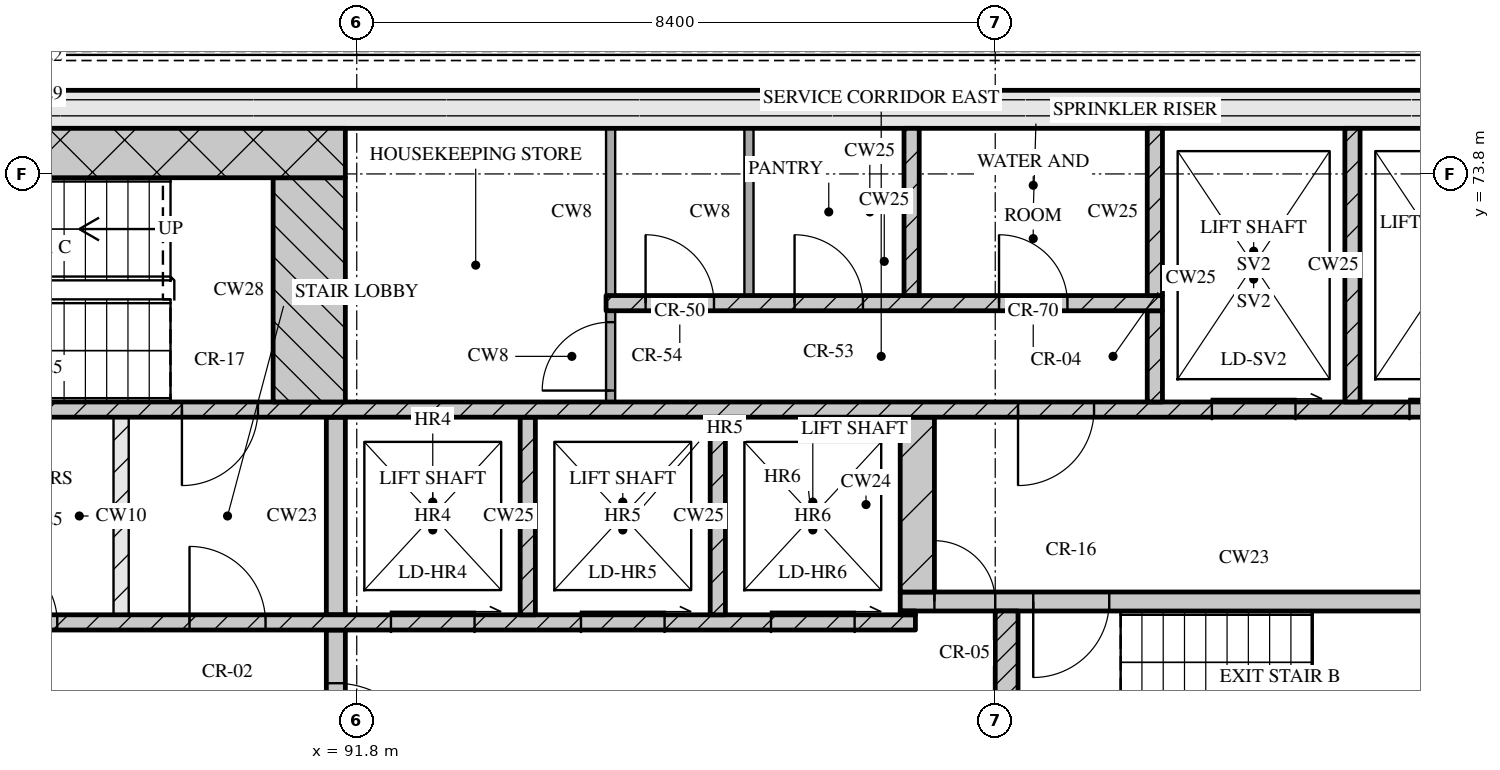
"""IFC4 building model, lengths in metres.
Left out: names, types, materials, properties, quantities, classifications, styles, units other than length and angle.
Written with IfcOpenShell. Run it as: python <this file> out.ifc"""

import sys

from ifc_helpers import new_model, si_unit, direction, frame, frame_2d, origin, place, context, subcontext, project, spatial, rectangle, extrude, element, fill, save


model = new_model("IFC4")
c1 = context("Model", 3, precision=1e-05, world=origin(), true_north=direction((0.0, 1.0)))
c2 = subcontext(c1, "Body", "Model", "MODEL_VIEW")
j1 = project(units=[si_unit("LENGTHUNIT", "METRE"), si_unit("PLANEANGLEUNIT", "RADIAN")], contexts=[c1])
p1 = place(None, origin())
s1 = spatial("IfcSite", under=j1, at=p1, CompositionType="ELEMENT")
p2 = place(p1, origin())
s2 = spatial("IfcBuilding", under=s1, at=p2, CompositionType="ELEMENT")
p3 = place(p2, frame((0.0, 0.0, 281.55)))
s3 = spatial("IfcBuildingStorey", under=s2, at=p3, CompositionType="ELEMENT", Elevation=281.55)
p4 = place(p3, frame((67.3, 74.65, 0.0), z_axis=(0.0, 0.0, 1.0), x_axis=(1.0, 0.0, 0.0)))
e1 = element("IfcWall", 1, at=p4, inside=s3, PredefinedType="SOLIDWALL", context=c2, shape_type="SweptSolid", body=[
    extrude(rectangle(XDim=40.6, YDim=0.5, at=frame_2d((20.3, 0.0))), origin(), (0.0, 0.0, 1.0), 3.32),
])
p5 = place(p3, frame((91.525, 65.2, 0.0), z_axis=(0.0, 0.0, 1.0), x_axis=(0.0, 1.0, 0.0)))
e2 = element("IfcWall", 2, at=p5, inside=s3, PredefinedType="SOLIDWALL", context=c2, shape_type="SweptSolid", body=[
    extrude(rectangle(XDim=2.6, YDim=0.25, at=frame_2d((1.3, 0.0))), origin(), (0.0, 0.0, 1.0), 3.32),
])
p6 = place(p5, frame((0.7, 0.0, 0.0)))
e3 = element("IfcOpeningElement", 3, at=p6, cuts=e2, PredefinedType="OPENING", context=c2, shape_type="SweptSolid", body=[
    extrude(rectangle(XDim=1.2, YDim=2.1, at=frame_2d((0.6, 1.05))), frame((0.0, 0.135, 0.0), z_axis=(0.0, -1.0, 0.0), x_axis=(1.0, 0.0, 0.0)), (0.0, 0.0, 1.0), 0.27),
])
p7 = place(p3, frame((100.35, 65.2, 0.0), z_axis=(0.0, 0.0, 1.0), x_axis=(0.0, 1.0, 0.0)))
e4 = element("IfcWall", 4, at=p7, inside=s3, PredefinedType="SOLIDWALL", context=c2, shape_type="SweptSolid", body=[
    extrude(rectangle(XDim=2.85, YDim=0.3, at=frame_2d((1.425, 0.0))), origin(), (0.0, 0.0, 1.0), 3.32),
])
p8 = place(p3, frame((76.05, 67.9, 0.0), z_axis=(0.0, 0.0, 1.0), x_axis=(1.0, 0.0, 0.0)))
e5 = element("IfcWall", 5, at=p8, inside=s3, PredefinedType="SOLIDWALL", context=c2, shape_type="SweptSolid", body=[
    extrude(rectangle(XDim=23.1, YDim=0.2, at=frame_2d((11.55, 0.0))), origin(), (0.0, 0.0, 1.0), 3.32),
])
p9 = place(p8, frame((1.35, 0.0, 0.0)))
e6 = element("IfcOpeningElement", 6, at=p9, cuts=e5, PredefinedType="OPENING", context=c2, shape_type="SweptSolid", body=[
    extrude(rectangle(XDim=0.9, YDim=2.1, at=frame_2d((0.45, 1.05))), frame((0.0, 0.11, 0.0), z_axis=(0.0, -1.0, 0.0), x_axis=(1.0, 0.0, 0.0)), (0.0, 0.0, 1.0), 0.22),
])
p10 = place(p8, frame((5.06, 0.0, 0.0)))
e7 = element("IfcOpeningElement", 7, at=p10, cuts=e5, PredefinedType="OPENING", context=c2, shape_type="SweptSolid", body=[
    extrude(rectangle(XDim=0.9, YDim=2.1, at=frame_2d((0.45, 1.05))), frame((0.0, 0.11, 0.0), z_axis=(0.0, -1.0, 0.0), x_axis=(1.0, 0.0, 0.0)), (0.0, 0.0, 1.0), 0.22),
])
p11 = place(p8, frame((8.45, 0.0, 0.0)))
e8 = element("IfcOpeningElement", 8, at=p11, cuts=e5, PredefinedType="OPENING", context=c2, shape_type="SweptSolid", body=[
    extrude(rectangle(XDim=0.9, YDim=2.1, at=frame_2d((0.45, 1.05))), frame((0.0, 0.11, 0.0), z_axis=(0.0, -1.0, 0.0), x_axis=(1.0, 0.0, 0.0)), (0.0, 0.0, 1.0), 0.22),
])
p12 = place(p8, frame((10.91, 0.0, 0.0)))
e9 = element("IfcOpeningElement", 9, at=p12, cuts=e5, PredefinedType="OPENING", context=c2, shape_type="SweptSolid", body=[
    extrude(rectangle(XDim=0.9, YDim=2.1, at=frame_2d((0.45, 1.05))), frame((0.0, 0.11, 0.0), z_axis=(0.0, -1.0, 0.0), x_axis=(1.0, 0.0, 0.0)), (0.0, 0.0, 1.0), 0.22),
])
p13 = place(p8, frame((13.55, 0.0, 0.0)))
e10 = element("IfcOpeningElement", 10, at=p13, cuts=e5, PredefinedType="OPENING", context=c2, shape_type="SweptSolid", body=[
    extrude(rectangle(XDim=1.0, YDim=2.1, at=frame_2d((0.5, 1.05))), frame((0.0, 0.11, 0.0), z_axis=(0.0, -1.0, 0.0), x_axis=(1.0, 0.0, 0.0)), (0.0, 0.0, 1.0), 0.22),
])
p14 = place(p8, frame((16.2, 0.0, 0.0)))
e11 = element("IfcOpeningElement", 11, at=p14, cuts=e5, PredefinedType="OPENING", context=c2, shape_type="SweptSolid", body=[
    extrude(rectangle(XDim=1.1, YDim=2.1, at=frame_2d((0.55, 1.05))), frame((0.0, 0.11, 0.0), z_axis=(0.0, -1.0, 0.0), x_axis=(1.0, 0.0, 0.0)), (0.0, 0.0, 1.0), 0.22),
])
p15 = place(p8, frame((18.7, 0.0, 0.0)))
e12 = element("IfcOpeningElement", 12, at=p15, cuts=e5, PredefinedType="OPENING", context=c2, shape_type="SweptSolid", body=[
    extrude(rectangle(XDim=1.1, YDim=2.1, at=frame_2d((0.55, 1.05))), frame((0.0, 0.11, 0.0), z_axis=(0.0, -1.0, 0.0), x_axis=(1.0, 0.0, 0.0)), (0.0, 0.0, 1.0), 0.22),
])
p16 = place(p8, frame((21.2, 0.0, 0.0)))
e13 = element("IfcOpeningElement", 13, at=p16, cuts=e5, PredefinedType="OPENING", context=c2, shape_type="SweptSolid", body=[
    extrude(rectangle(XDim=1.1, YDim=2.1, at=frame_2d((0.55, 1.05))), frame((0.0, 0.11, 0.0), z_axis=(0.0, -1.0, 0.0), x_axis=(1.0, 0.0, 0.0)), (0.0, 0.0, 1.0), 0.22),
])
p17 = place(p3, frame((88.7, 68.0, 0.0), z_axis=(0.0, 0.0, 1.0), x_axis=(0.0, 1.0, 0.0)))
e14 = element("IfcWall", 14, at=p17, inside=s3, PredefinedType="PARTITIONING", context=c2, shape_type="SweptSolid", body=[
    extrude(rectangle(XDim=2.6, YDim=0.2, at=frame_2d((1.3, 0.0))), origin(), (0.0, 0.0, 1.0), 3.32),
])
p18 = place(p3, frame((91.525, 68.0, 0.0), z_axis=(0.0, 0.0, 1.0), x_axis=(0.0, 1.0, 0.0)))
e15 = element("IfcWall", 15, at=p18, inside=s3, PredefinedType="SOLIDWALL", context=c2, shape_type="SweptSolid", body=[
    extrude(rectangle(XDim=2.6, YDim=0.25, at=frame_2d((1.3, 0.0))), origin(), (0.0, 0.0, 1.0), 3.32),
])
for number, where, z_axis, x_axis in (
    (16, (94.05, 68.0, 0.0), (0.0, 0.0, 1.0), (0.0, 1.0, 0.0)),
    (17, (96.55, 68.0, 0.0), (0.0, 0.0, 1.0), (0.0, 1.0, 0.0)),
):
    element("IfcWall", number, at=place(p3, frame(where, z_axis=z_axis, x_axis=x_axis)), inside=s3, PredefinedType="SOLIDWALL", context=c2, shape_type="SweptSolid", body=[
        extrude(rectangle(XDim=2.6, YDim=0.2, at=frame_2d((1.3, 0.0))), origin(), (0.0, 0.0, 1.0), 3.32),
    ])
p19 = place(p3, frame((98.95, 68.025, 0.0), z_axis=(0.0, 0.0, 1.0), x_axis=(1.0, 0.0, 0.0)))
e18 = element("IfcWall", 18, at=p19, inside=s3, PredefinedType="SOLIDWALL", context=c2, shape_type="SweptSolid", body=[
    extrude(rectangle(XDim=0.2, YDim=0.05, at=frame_2d((0.1, 0.0))), origin(), (0.0, 0.0, 1.0), 3.32),
])
p20 = place(p3, frame((98.95, 68.175, 0.0), z_axis=(0.0, 0.0, 1.0), x_axis=(1.0, 0.0, 0.0)))
e19 = element("IfcWall", 19, at=p20, inside=s3, PredefinedType="SOLIDWALL", context=c2, shape_type="SweptSolid", body=[
    extrude(rectangle(XDim=8.45, YDim=0.25, at=frame_2d((4.225, 0.0))), origin(), (0.0, 0.0, 1.0), 3.32),
])
p21 = place(p20, frame((0.45, 0.0, 0.0)))
e20 = element("IfcOpeningElement", 20, at=p21, cuts=e19, PredefinedType="OPENING", context=c2, shape_type="SweptSolid", body=[
    extrude(rectangle(XDim=0.8, YDim=2.1, at=frame_2d((0.4, 1.05))), frame((0.0, 0.135, 0.0), z_axis=(0.0, -1.0, 0.0), x_axis=(1.0, 0.0, 0.0)), (0.0, 0.0, 1.0), 0.27),
])
p22 = place(p20, frame((1.75, 0.0, 0.0)))
e21 = element("IfcOpeningElement", 21, at=p22, cuts=e19, PredefinedType="OPENING", context=c2, shape_type="SweptSolid", body=[
    extrude(rectangle(XDim=1.0, YDim=2.1, at=frame_2d((0.5, 1.05))), frame((0.0, 0.135, 0.0), z_axis=(0.0, -1.0, 0.0), x_axis=(1.0, 0.0, 0.0)), (0.0, 0.0, 1.0), 0.27),
])
p23 = place(p3, frame((99.175, 68.3, 0.0), z_axis=(0.0, 0.0, 1.0), x_axis=(0.0, 1.0, 0.0)))
e22 = element("IfcWall", 22, at=p23, inside=s3, PredefinedType="SOLIDWALL", context=c2, shape_type="SweptSolid", body=[
    extrude(rectangle(XDim=2.3, YDim=0.45, at=frame_2d((1.15, 0.0))), origin(), (0.0, 0.0, 1.0), 3.32),
])
p24 = place(p3, frame((67.8, 70.7, 0.0), z_axis=(0.0, 0.0, 1.0), x_axis=(1.0, 0.0, 0.0)))
e23 = element("IfcWall", 23, at=p24, inside=s3, PredefinedType="SOLIDWALL", context=c2, shape_type="SweptSolid", body=[
    extrude(rectangle(XDim=39.6, YDim=0.2, at=frame_2d((19.8, 0.0))), origin(), (0.0, 0.0, 1.0), 3.32),
])
p25 = place(p24, frame((0.65, 0.0, 0.0)))
e24 = element("IfcOpeningElement", 24, at=p25, cuts=e23, PredefinedType="OPENING", context=c2, shape_type="SweptSolid", body=[
    extrude(rectangle(XDim=1.1, YDim=2.1, at=frame_2d((0.55, 1.05))), frame((0.0, 0.11, 0.0), z_axis=(0.0, -1.0, 0.0), x_axis=(1.0, 0.0, 0.0)), (0.0, 0.0, 1.0), 0.22),
])
p26 = place(p24, frame((3.25, 0.0, 0.0)))
e25 = element("IfcOpeningElement", 25, at=p26, cuts=e23, PredefinedType="OPENING", context=c2, shape_type="SweptSolid", body=[
    extrude(rectangle(XDim=1.1, YDim=2.1, at=frame_2d((0.55, 1.05))), frame((0.0, 0.11, 0.0), z_axis=(0.0, -1.0, 0.0), x_axis=(1.0, 0.0, 0.0)), (0.0, 0.0, 1.0), 0.22),
])
p27 = place(p24, frame((5.9, 0.0, 0.0)))
e26 = element("IfcOpeningElement", 26, at=p27, cuts=e23, PredefinedType="OPENING", context=c2, shape_type="SweptSolid", body=[
    extrude(rectangle(XDim=1.0, YDim=2.1, at=frame_2d((0.5, 1.05))), frame((0.0, 0.11, 0.0), z_axis=(0.0, -1.0, 0.0), x_axis=(1.0, 0.0, 0.0)), (0.0, 0.0, 1.0), 0.22),
])
p28 = place(p24, frame((21.7, 0.0, 0.0)))
e27 = element("IfcOpeningElement", 27, at=p28, cuts=e23, PredefinedType="OPENING", context=c2, shape_type="SweptSolid", body=[
    extrude(rectangle(XDim=1.0, YDim=2.1, at=frame_2d((0.5, 1.05))), frame((0.0, 0.11, 0.0), z_axis=(0.0, -1.0, 0.0), x_axis=(1.0, 0.0, 0.0)), (0.0, 0.0, 1.0), 0.22),
])
p29 = place(p24, frame((32.7, 0.0, 0.0)))
e28 = element("IfcOpeningElement", 28, at=p29, cuts=e23, PredefinedType="OPENING", context=c2, shape_type="SweptSolid", body=[
    extrude(rectangle(XDim=1.0, YDim=2.1, at=frame_2d((0.5, 1.05))), frame((0.0, 0.11, 0.0), z_axis=(0.0, -1.0, 0.0), x_axis=(1.0, 0.0, 0.0)), (0.0, 0.0, 1.0), 0.22),
])
p30 = place(p24, frame((35.25, 0.0, 0.0)))
e29 = element("IfcOpeningElement", 29, at=p30, cuts=e23, PredefinedType="OPENING", context=c2, shape_type="SweptSolid", body=[
    extrude(rectangle(XDim=1.1, YDim=2.1, at=frame_2d((0.55, 1.05))), frame((0.0, 0.11, 0.0), z_axis=(0.0, -1.0, 0.0), x_axis=(1.0, 0.0, 0.0)), (0.0, 0.0, 1.0), 0.22),
])
p31 = place(p24, frame((37.85, 0.0, 0.0)))
e30 = element("IfcOpeningElement", 30, at=p31, cuts=e23, PredefinedType="OPENING", context=c2, shape_type="SweptSolid", body=[
    extrude(rectangle(XDim=1.1, YDim=2.1, at=frame_2d((0.55, 1.05))), frame((0.0, 0.11, 0.0), z_axis=(0.0, -1.0, 0.0), x_axis=(1.0, 0.0, 0.0)), (0.0, 0.0, 1.0), 0.22),
])
p32 = place(p3, frame((91.175, 70.8, 0.0), z_axis=(0.0, 0.0, 1.0), x_axis=(0.0, 1.0, 0.0)))
e31 = element("IfcWall", 31, at=p32, inside=s3, PredefinedType="SOLIDWALL", context=c2, shape_type="SweptSolid", body=[
    extrude(rectangle(XDim=2.95, YDim=0.95, at=frame_2d((1.475, 0.0))), origin(), (0.0, 0.0, 1.0), 3.32),
])
p33 = place(p3, frame((95.14, 70.8, 0.0), z_axis=(0.0, 0.0, 1.0), x_axis=(0.0, 1.0, 0.0)))
e32 = element("IfcWall", 32, at=p33, inside=s3, PredefinedType="PARTITIONING", context=c2, shape_type="SweptSolid", body=[
    extrude(rectangle(XDim=1.2, YDim=0.12, at=frame_2d((0.6, 0.0))), origin(), (0.0, 0.0, 1.0), 3.32),
])
p34 = place(p33, frame((0.15, 0.0, 0.0)))
e33 = element("IfcOpeningElement", 33, at=p34, cuts=e32, PredefinedType="OPENING", context=c2, shape_type="SweptSolid", body=[
    extrude(rectangle(XDim=0.9, YDim=2.1, at=frame_2d((0.45, 1.05))), frame((0.0, 0.07, 0.0), z_axis=(0.0, -1.0, 0.0), x_axis=(1.0, 0.0, 0.0)), (0.0, 0.0, 1.0), 0.14),
])
p35 = place(p3, frame((102.3, 70.8, 0.0), z_axis=(0.0, 0.0, 1.0), x_axis=(0.0, 1.0, 0.0)))
e34 = element("IfcWall", 34, at=p35, inside=s3, PredefinedType="SOLIDWALL", context=c2, shape_type="SweptSolid", body=[
    extrude(rectangle(XDim=1.2, YDim=0.2, at=frame_2d((0.6, 0.0))), origin(), (0.0, 0.0, 1.0), 3.32),
])
p36 = place(p3, frame((104.9, 70.8, 0.0), z_axis=(0.0, 0.0, 1.0), x_axis=(0.0, 1.0, 0.0)))
e35 = element("IfcWall", 35, at=p36, inside=s3, PredefinedType="SOLIDWALL", context=c2, shape_type="SweptSolid", body=[
    extrude(rectangle(XDim=3.6, YDim=0.2, at=frame_2d((1.8, 0.0))), origin(), (0.0, 0.0, 1.0), 3.32),
])
p37 = place(p3, frame((95.08, 72.1, 0.0), z_axis=(0.0, 0.0, 1.0), x_axis=(1.0, 0.0, 0.0)))
e36 = element("IfcWall", 36, at=p37, inside=s3, PredefinedType="SOLIDWALL", context=c2, shape_type="SweptSolid", body=[
    extrude(rectangle(XDim=7.32, YDim=0.2, at=frame_2d((3.66, 0.0))), origin(), (0.0, 0.0, 1.0), 3.32),
])
p38 = place(p37, frame((0.52, 0.0, 0.0)))
e37 = element("IfcOpeningElement", 37, at=p38, cuts=e36, PredefinedType="OPENING", context=c2, shape_type="SweptSolid", body=[
    extrude(rectangle(XDim=0.9, YDim=2.1, at=frame_2d((0.45, 1.05))), frame((0.0, 0.11, 0.0), z_axis=(0.0, -1.0, 0.0), x_axis=(1.0, 0.0, 0.0)), (0.0, 0.0, 1.0), 0.22),
])
p39 = place(p37, frame((2.48, 0.0, 0.0)))
e38 = element("IfcOpeningElement", 38, at=p39, cuts=e36, PredefinedType="OPENING", context=c2, shape_type="SweptSolid", body=[
    extrude(rectangle(XDim=0.9, YDim=2.1, at=frame_2d((0.45, 1.05))), frame((0.0, 0.11, 0.0), z_axis=(0.0, -1.0, 0.0), x_axis=(1.0, 0.0, 0.0)), (0.0, 0.0, 1.0), 0.22),
])
p40 = place(p37, frame((5.17, 0.0, 0.0)))
e39 = element("IfcOpeningElement", 39, at=p40, cuts=e36, PredefinedType="OPENING", context=c2, shape_type="SweptSolid", body=[
    extrude(rectangle(XDim=0.9, YDim=2.1, at=frame_2d((0.45, 1.05))), frame((0.0, 0.11, 0.0), z_axis=(0.0, -1.0, 0.0), x_axis=(1.0, 0.0, 0.0)), (0.0, 0.0, 1.0), 0.22),
])
for number, where, z_axis, x_axis in (
    (40, (95.14, 72.2, 0.0), (0.0, 0.0, 1.0), (0.0, 1.0, 0.0)),
    (41, (96.96, 72.2, 0.0), (0.0, 0.0, 1.0), (0.0, 1.0, 0.0)),
):
    element("IfcWall", number, at=place(p3, frame(where, z_axis=z_axis, x_axis=x_axis)), inside=s3, PredefinedType="PARTITIONING", context=c2, shape_type="SweptSolid", body=[
        extrude(rectangle(XDim=2.2, YDim=0.12, at=frame_2d((1.1, 0.0))), origin(), (0.0, 0.0, 1.0), 3.32),
    ])
for number, where, z_axis, x_axis in (
    (42, (99.1, 72.2, 0.0), (0.0, 0.0, 1.0), (0.0, 1.0, 0.0)),
    (43, (102.3, 72.2, 0.0), (0.0, 0.0, 1.0), (0.0, 1.0, 0.0)),
):
    element("IfcWall", number, at=place(p3, frame(where, z_axis=z_axis, x_axis=x_axis)), inside=s3, PredefinedType="SOLIDWALL", context=c2, shape_type="SweptSolid", body=[
        extrude(rectangle(XDim=2.2, YDim=0.2, at=frame_2d((1.1, 0.0))), origin(), (0.0, 0.0, 1.0), 3.32),
    ])
p41 = place(p3, frame((83.55, 74.075, 0.0), z_axis=(0.0, 0.0, 1.0), x_axis=(1.0, 0.0, 0.0)))
e44 = element("IfcWall", 44, at=p41, inside=s3, PredefinedType="SOLIDWALL", context=c2, shape_type="SweptSolid", body=[
    extrude(rectangle(XDim=8.1, YDim=0.65, at=frame_2d((4.05, 0.0))), origin(), (0.0, 0.0, 1.0), 3.32),
])
p42 = place(p6, origin())
e45 = element("IfcDoor", 45, at=p42, inside=s3, OperationType="SINGLE_SWING_RIGHT", PredefinedType="DOOR", context=c2, shape_type="SweptSolid", body=[
    extrude(rectangle(XDim=1.2, YDim=2.1, at=frame_2d((0.6, 1.05))), frame((0.0, 0.025, 0.0), z_axis=(0.0, -1.0, 0.0), x_axis=(1.0, 0.0, 0.0)), (0.0, 0.0, 1.0), 0.05),
])
fill(e3, e45)
p43 = place(p12, origin())
e46 = element("IfcDoor", 46, at=p43, inside=s3, OperationType="SINGLE_SWING_LEFT", PredefinedType="DOOR", context=c2, shape_type="SweptSolid", body=[
    extrude(rectangle(XDim=0.9, YDim=2.1, at=frame_2d((0.45, 1.05))), frame((0.0, 0.025, 0.0), z_axis=(0.0, -1.0, 0.0), x_axis=(1.0, 0.0, 0.0)), (0.0, 0.0, 1.0), 0.05),
])
fill(e9, e46)
p44 = place(p13, origin())
e47 = element("IfcDoor", 47, at=p44, inside=s3, OperationType="SINGLE_SWING_LEFT", PredefinedType="DOOR", context=c2, shape_type="SweptSolid", body=[
    extrude(rectangle(XDim=1.0, YDim=2.1, at=frame_2d((0.5, 1.05))), frame((0.0, 0.025, 0.0), z_axis=(0.0, -1.0, 0.0), x_axis=(1.0, 0.0, 0.0)), (0.0, 0.0, 1.0), 0.05),
])
fill(e10, e47)
p45 = place(p14, origin())
e48 = element("IfcDoor", 48, at=p45, inside=s3, OperationType="SLIDING_TO_RIGHT", PredefinedType="DOOR", context=c2, shape_type="SweptSolid", body=[
    extrude(rectangle(XDim=1.1, YDim=2.1, at=frame_2d((0.55, 1.05))), frame((0.0, 0.025, 0.0), z_axis=(0.0, -1.0, 0.0), x_axis=(1.0, 0.0, 0.0)), (0.0, 0.0, 1.0), 0.05),
])
fill(e11, e48)
p46 = place(p15, origin())
e49 = element("IfcDoor", 49, at=p46, inside=s3, OperationType="SLIDING_TO_RIGHT", PredefinedType="DOOR", context=c2, shape_type="SweptSolid", body=[
    extrude(rectangle(XDim=1.1, YDim=2.1, at=frame_2d((0.55, 1.05))), frame((0.0, 0.025, 0.0), z_axis=(0.0, -1.0, 0.0), x_axis=(1.0, 0.0, 0.0)), (0.0, 0.0, 1.0), 0.05),
])
fill(e12, e49)
p47 = place(p16, origin())
e50 = element("IfcDoor", 50, at=p47, inside=s3, OperationType="SLIDING_TO_RIGHT", PredefinedType="DOOR", context=c2, shape_type="SweptSolid", body=[
    extrude(rectangle(XDim=1.1, YDim=2.1, at=frame_2d((0.55, 1.05))), frame((0.0, 0.025, 0.0), z_axis=(0.0, -1.0, 0.0), x_axis=(1.0, 0.0, 0.0)), (0.0, 0.0, 1.0), 0.05),
])
fill(e13, e50)
p48 = place(p21, origin())
e51 = element("IfcDoor", 51, at=p48, inside=s3, OperationType="SINGLE_SWING_LEFT", PredefinedType="DOOR", context=c2, shape_type="SweptSolid", body=[
    extrude(rectangle(XDim=0.8, YDim=2.1, at=frame_2d((0.4, 1.05))), frame((0.0, 0.025, 0.0), z_axis=(0.0, -1.0, 0.0), x_axis=(1.0, 0.0, 0.0)), (0.0, 0.0, 1.0), 0.05),
])
fill(e20, e51)
p49 = place(p22, origin())
e52 = element("IfcDoor", 52, at=p49, inside=s3, OperationType="SINGLE_SWING_RIGHT", PredefinedType="DOOR", context=c2, shape_type="SweptSolid", body=[
    extrude(rectangle(XDim=1.0, YDim=2.1, at=frame_2d((0.5, 1.05))), frame((0.0, 0.025, 0.0), z_axis=(0.0, -1.0, 0.0), x_axis=(1.0, 0.0, 0.0)), (0.0, 0.0, 1.0), 0.05),
])
fill(e21, e52)
p50 = place(p28, origin())
e53 = element("IfcDoor", 53, at=p50, inside=s3, OperationType="SINGLE_SWING_RIGHT", PredefinedType="DOOR", context=c2, shape_type="SweptSolid", body=[
    extrude(rectangle(XDim=1.0, YDim=2.1, at=frame_2d((0.5, 1.05))), frame((0.0, 0.025, 0.0), z_axis=(0.0, -1.0, 0.0), x_axis=(1.0, 0.0, 0.0)), (0.0, 0.0, 1.0), 0.05),
])
fill(e27, e53)
p51 = place(p29, origin())
e54 = element("IfcDoor", 54, at=p51, inside=s3, OperationType="SINGLE_SWING_RIGHT", PredefinedType="DOOR", context=c2, shape_type="SweptSolid", body=[
    extrude(rectangle(XDim=1.0, YDim=2.1, at=frame_2d((0.5, 1.05))), frame((0.0, 0.025, 0.0), z_axis=(0.0, -1.0, 0.0), x_axis=(1.0, 0.0, 0.0)), (0.0, 0.0, 1.0), 0.05),
])
fill(e28, e54)
p52 = place(p30, origin())
e55 = element("IfcDoor", 55, at=p52, inside=s3, OperationType="SLIDING_TO_RIGHT", PredefinedType="DOOR", context=c2, shape_type="SweptSolid", body=[
    extrude(rectangle(XDim=1.1, YDim=2.1, at=frame_2d((0.55, 1.05))), frame((0.0, 0.025, 0.0), z_axis=(0.0, -1.0, 0.0), x_axis=(1.0, 0.0, 0.0)), (0.0, 0.0, 1.0), 0.05),
])
fill(e29, e55)
p53 = place(p31, origin())
e56 = element("IfcDoor", 56, at=p53, inside=s3, OperationType="SLIDING_TO_RIGHT", PredefinedType="DOOR", context=c2, shape_type="SweptSolid", body=[
    extrude(rectangle(XDim=1.1, YDim=2.1, at=frame_2d((0.55, 1.05))), frame((0.0, 0.025, 0.0), z_axis=(0.0, -1.0, 0.0), x_axis=(1.0, 0.0, 0.0)), (0.0, 0.0, 1.0), 0.05),
])
fill(e30, e56)
p54 = place(p34, origin())
e57 = element("IfcDoor", 57, at=p54, inside=s3, OperationType="SINGLE_SWING_LEFT", PredefinedType="DOOR", context=c2, shape_type="SweptSolid", body=[
    extrude(rectangle(XDim=0.9, YDim=2.1, at=frame_2d((0.45, 1.05))), frame((0.0, 0.025, 0.0), z_axis=(0.0, -1.0, 0.0), x_axis=(1.0, 0.0, 0.0)), (0.0, 0.0, 1.0), 0.05),
])
fill(e33, e57)
p55 = place(p38, origin())
e58 = element("IfcDoor", 58, at=p55, inside=s3, OperationType="SINGLE_SWING_LEFT", PredefinedType="DOOR", context=c2, shape_type="SweptSolid", body=[
    extrude(rectangle(XDim=0.9, YDim=2.1, at=frame_2d((0.45, 1.05))), frame((0.0, 0.025, 0.0), z_axis=(0.0, -1.0, 0.0), x_axis=(1.0, 0.0, 0.0)), (0.0, 0.0, 1.0), 0.05),
])
fill(e37, e58)
p56 = place(p39, origin())
e59 = element("IfcDoor", 59, at=p56, inside=s3, OperationType="SINGLE_SWING_LEFT", PredefinedType="DOOR", context=c2, shape_type="SweptSolid", body=[
    extrude(rectangle(XDim=0.9, YDim=2.1, at=frame_2d((0.45, 1.05))), frame((0.0, 0.025, 0.0), z_axis=(0.0, -1.0, 0.0), x_axis=(1.0, 0.0, 0.0)), (0.0, 0.0, 1.0), 0.05),
])
fill(e38, e59)
p57 = place(p40, origin())
e60 = element("IfcDoor", 60, at=p57, inside=s3, OperationType="SINGLE_SWING_LEFT", PredefinedType="DOOR", context=c2, shape_type="SweptSolid", body=[
    extrude(rectangle(XDim=0.9, YDim=2.1, at=frame_2d((0.45, 1.05))), frame((0.0, 0.025, 0.0), z_axis=(0.0, -1.0, 0.0), x_axis=(1.0, 0.0, 0.0)), (0.0, 0.0, 1.0), 0.05),
])
fill(e39, e60)
save(model, sys.argv[1])
